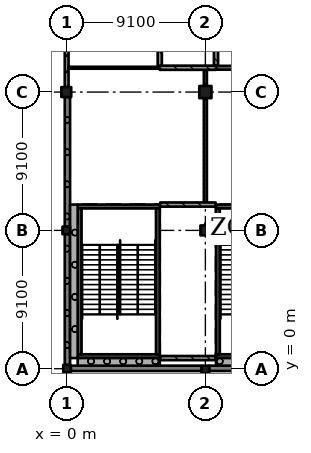
"""IFC4 building model, lengths in metres.
Left out: names, types, materials, properties, quantities, classifications, styles, units other than length and angle.
Written with IfcOpenShell. Run it as: python <this file> out.ifc"""

import sys

from ifc_helpers import new_model, si_unit, direction, frame, frame_2d, origin, origin_2d, place, context, subcontext, project, spatial, rectangle, extrude, element, fill, save


model = new_model("IFC4")
c1 = context("Model", 3, precision=1e-05, world=origin(), true_north=direction((0.0, 1.0)))
c2 = subcontext(c1, "Body", "Model", "MODEL_VIEW")
j1 = project(units=[si_unit("LENGTHUNIT", "METRE"), si_unit("PLANEANGLEUNIT", "RADIAN")], contexts=[c1])
p1 = place(None, origin())
s1 = spatial("IfcSite", under=j1, at=p1, CompositionType="ELEMENT")
p2 = place(p1, origin())
s2 = spatial("IfcBuilding", under=s1, at=p2, CompositionType="ELEMENT")
p3 = place(p2, frame((0.0, 0.0, 10.92)))
s3 = spatial("IfcBuildingStorey", under=s2, at=p3, CompositionType="ELEMENT", Elevation=10.92)
for number, where, z_axis, x_axis in (
    (1, (0.0, 0.0, 0.0), (0.0, 0.0, 1.0), (1.0, 0.0, 0.0)),
    (2, (-0.05, 9.1, 0.0), (0.0, 0.0, 1.0), (1.0, 0.0, 0.0)),
):
    element("IfcColumn", number, at=place(p3, frame(where, z_axis=z_axis, x_axis=x_axis)), inside=s3, PredefinedType="COLUMN", context=c2, shape_type="SweptSolid", body=[
        extrude(rectangle(XDim=0.5, YDim=0.5, at=origin_2d()), origin(), (0.0, 0.0, 1.0), 4.55),
    ])
p4 = place(p3, frame((-0.05, 18.2, 0.0), z_axis=(0.0, 0.0, 1.0), x_axis=(1.0, 0.0, 0.0)))
e3 = element("IfcColumn", 3, at=p4, inside=s3, PredefinedType="COLUMN", context=c2, shape_type="SweptSolid", body=[
    extrude(rectangle(XDim=0.65, YDim=0.65, at=origin_2d()), origin(), (0.0, 0.0, 1.0), 4.55),
])
p5 = place(p3, frame((9.1, -0.05, 0.0), z_axis=(0.0, 0.0, 1.0), x_axis=(1.0, 0.0, 0.0)))
e4 = element("IfcColumn", 4, at=p5, inside=s3, PredefinedType="COLUMN", context=c2, shape_type="SweptSolid", body=[
    extrude(rectangle(XDim=0.5, YDim=0.5, at=origin_2d()), origin(), (0.0, 0.0, 1.0), 4.55),
])
p6 = place(p3, frame((9.1, 9.1, 0.0), z_axis=(0.0, 0.0, 1.0), x_axis=(1.0, 0.0, 0.0)))
e5 = element("IfcColumn", 5, at=p6, inside=s3, PredefinedType="COLUMN", context=c2, shape_type="SweptSolid", body=[
    extrude(rectangle(XDim=0.65, YDim=0.65, at=origin_2d()), origin(), (0.0, 0.0, 1.0), 4.55),
])
p7 = place(p3, frame((9.1, 18.2, 0.0), z_axis=(0.0, 0.0, 1.0), x_axis=(1.0, 0.0, 0.0)))
e6 = element("IfcColumn", 6, at=p7, inside=s3, PredefinedType="COLUMN", context=c2, shape_type="SweptSolid", body=[
    extrude(rectangle(XDim=0.8, YDim=0.8, at=origin_2d()), origin(), (0.0, 0.0, 1.0), 4.55),
])
p8 = place(p3, frame((6.1, 0.825, 0.0), z_axis=(0.0, 0.0, 1.0), x_axis=(-1.0, 0.0, 0.0)))
e7 = element("IfcWall", 7, at=p8, inside=s3, PredefinedType="SHEAR", context=c2, shape_type="SweptSolid", body=[
    extrude(rectangle(XDim=5.4, YDim=0.25, at=frame_2d((2.7, 0.0))), origin(), (0.0, 0.0, 1.0), 4.55),
])
p9 = place(p3, frame((6.1, 10.675, 0.0), z_axis=(0.0, 0.0, 1.0), x_axis=(-1.0, 0.0, 0.0)))
e8 = element("IfcWall", 8, at=p9, inside=s3, PredefinedType="SHEAR", context=c2, shape_type="SweptSolid", body=[
    extrude(rectangle(XDim=5.4, YDim=0.25, at=frame_2d((2.7, 0.0))), origin(), (0.0, 0.0, 1.0), 4.55),
])
p10 = place(p9, frame((1.5, 0.0, 0.0)))
e9 = element("IfcOpeningElement", 9, at=p10, cuts=e8, PredefinedType="OPENING", context=c2, shape_type="SweptSolid", body=[
    extrude(rectangle(XDim=2.4, YDim=2.1, at=frame_2d((1.2, 1.05))), frame((0.0, 0.135, 0.0), z_axis=(0.0, -1.0, 0.0), x_axis=(1.0, 0.0, 0.0)), (0.0, 0.0, 1.0), 0.27),
])
for number, where, z_axis, x_axis in (
    (10, (0.825, 10.55, 0.0), (0.0, 0.0, 1.0), (0.0, -1.0, 0.0)),
    (11, (5.975, 10.55, 0.0), (0.0, 0.0, 1.0), (0.0, -1.0, 0.0)),
):
    element("IfcWall", number, at=place(p3, frame(where, z_axis=z_axis, x_axis=x_axis)), inside=s3, PredefinedType="SHEAR", context=c2, shape_type="SweptSolid", body=[
        extrude(rectangle(XDim=9.6, YDim=0.25, at=frame_2d((4.8, 0.0))), origin(), (0.0, 0.0, 1.0), 4.55),
    ])
p11 = place(p3, frame((15.2, 0.825, 0.0), z_axis=(0.0, 0.0, 1.0), x_axis=(-1.0, 0.0, 0.0)))
e12 = element("IfcWall", 12, at=p11, inside=s3, PredefinedType="SHEAR", context=c2, shape_type="SweptSolid", body=[
    extrude(rectangle(XDim=5.4, YDim=0.25, at=frame_2d((2.7, 0.0))), origin(), (0.0, 0.0, 1.0), 4.55),
])
p12 = place(p3, frame((15.2, 10.675, 0.0), z_axis=(0.0, 0.0, 1.0), x_axis=(-1.0, 0.0, 0.0)))
e13 = element("IfcWall", 13, at=p12, inside=s3, PredefinedType="SHEAR", context=c2, shape_type="SweptSolid", body=[
    extrude(rectangle(XDim=5.4, YDim=0.25, at=frame_2d((2.7, 0.0))), origin(), (0.0, 0.0, 1.0), 4.55),
])
p13 = place(p12, frame((1.5, 0.0, 0.0)))
e14 = element("IfcOpeningElement", 14, at=p13, cuts=e13, PredefinedType="OPENING", context=c2, shape_type="SweptSolid", body=[
    extrude(rectangle(XDim=2.4, YDim=2.1, at=frame_2d((1.2, 1.05))), frame((0.0, 0.135, 0.0), z_axis=(0.0, -1.0, 0.0), x_axis=(1.0, 0.0, 0.0)), (0.0, 0.0, 1.0), 0.27),
])
p14 = place(p3, frame((9.925, 10.55, 0.0), z_axis=(0.0, 0.0, 1.0), x_axis=(0.0, -1.0, 0.0)))
e15 = element("IfcWall", 15, at=p14, inside=s3, PredefinedType="SHEAR", context=c2, shape_type="SweptSolid", body=[
    extrude(rectangle(XDim=9.6, YDim=0.25, at=frame_2d((4.8, 0.0))), origin(), (0.0, 0.0, 1.0), 4.55),
])
p15 = place(p3, frame((0.25, 0.025, 0.0), z_axis=(0.0, 0.0, 1.0), x_axis=(1.0, 0.0, 0.0)))
e16 = element("IfcWall", 16, at=p15, inside=s3, PredefinedType="SOLIDWALL", context=c2, shape_type="SweptSolid", body=[
    extrude(rectangle(XDim=8.6, YDim=0.35, at=frame_2d((4.3, 0.0))), origin(), (0.0, 0.0, 1.0), 3.5),
])
p16 = place(p3, frame((9.35, 0.025, 0.0), z_axis=(0.0, 0.0, 1.0), x_axis=(1.0, 0.0, 0.0)))
e17 = element("IfcWall", 17, at=p16, inside=s3, PredefinedType="SOLIDWALL", context=c2, shape_type="SweptSolid", body=[
    extrude(rectangle(XDim=5.85, YDim=0.35, at=frame_2d((2.925, 0.0))), origin(), (0.0, 0.0, 1.0), 3.5),
])
p17 = place(p3, frame((-0.025, 26.975, 0.0), z_axis=(0.0, 0.0, 1.0), x_axis=(0.0, -1.0, 0.0)))
e18 = element("IfcWall", 18, at=p17, inside=s3, PredefinedType="SOLIDWALL", context=c2, shape_type="SweptSolid", body=[
    extrude(rectangle(XDim=8.45, YDim=0.25, at=frame_2d((4.225, 0.0))), origin(), (0.0, 0.0, 1.0), 3.5),
])
p18 = place(p3, frame((0.025, 17.875, 0.0), z_axis=(0.0, 0.0, 1.0), x_axis=(0.0, -1.0, 0.0)))
e19 = element("IfcWall", 19, at=p18, inside=s3, PredefinedType="SOLIDWALL", context=c2, shape_type="SweptSolid", body=[
    extrude(rectangle(XDim=8.525, YDim=0.35, at=frame_2d((4.262, 0.0))), origin(), (0.0, 0.0, 1.0), 3.5),
])
p19 = place(p3, frame((0.025, 8.85, 0.0), z_axis=(0.0, 0.0, 1.0), x_axis=(0.0, -1.0, 0.0)))
e20 = element("IfcWall", 20, at=p19, inside=s3, PredefinedType="SOLIDWALL", context=c2, shape_type="SweptSolid", body=[
    extrude(rectangle(XDim=8.6, YDim=0.35, at=frame_2d((4.3, 0.0))), origin(), (0.0, 0.0, 1.0), 3.5),
])
p20 = place(p3, frame((0.7, 0.45, 0.0), z_axis=(0.0, 0.0, 1.0), x_axis=(1.0, 0.0, 0.0)))
e21 = element("IfcWall", 21, at=p20, inside=s3, PredefinedType="SOLIDWALL", context=c2, shape_type="SweptSolid", body=[
    extrude(rectangle(XDim=5.4, YDim=0.5, at=frame_2d((2.7, 0.0))), origin(), (0.0, 0.0, 1.0), 4.55),
])
p21 = place(p3, frame((0.45, 0.7, 0.0), z_axis=(0.0, 0.0, 1.0), x_axis=(0.0, 1.0, 0.0)))
e22 = element("IfcWall", 22, at=p21, inside=s3, PredefinedType="SOLIDWALL", context=c2, shape_type="SweptSolid", body=[
    extrude(rectangle(XDim=10.1, YDim=0.5, at=frame_2d((5.05, 0.0))), origin(), (0.0, 0.0, 1.0), 4.25),
])
p22 = place(p3, frame((9.8, 0.45, 0.0), z_axis=(0.0, 0.0, 1.0), x_axis=(1.0, 0.0, 0.0)))
e23 = element("IfcWall", 23, at=p22, inside=s3, PredefinedType="SOLIDWALL", context=c2, shape_type="SweptSolid", body=[
    extrude(rectangle(XDim=5.4, YDim=0.5, at=frame_2d((2.7, 0.0))), origin(), (0.0, 0.0, 1.0), 4.55),
])
p23 = place(p3, frame((0.1, 19.8, 0.0), z_axis=(0.0, 0.0, 1.0), x_axis=(1.0, 0.0, 0.0)))
e24 = element("IfcWall", 24, at=p23, inside=s3, PredefinedType="PARTITIONING", context=c2, shape_type="SweptSolid", body=[
    extrude(rectangle(XDim=6.0, YDim=0.125, at=frame_2d((3.0, 0.0))), origin(), (0.0, 0.0, 1.0), 4.25),
])
p24 = place(p23, frame((2.85, 0.0, 0.0)))
e25 = element("IfcOpeningElement", 25, at=p24, cuts=e24, PredefinedType="OPENING", context=c2, shape_type="SweptSolid", body=[
    extrude(rectangle(XDim=0.9, YDim=2.1, at=frame_2d((0.45, 1.05))), frame((0.0, 0.073, 0.0), z_axis=(0.0, -1.0, 0.0), x_axis=(1.0, 0.0, 0.0)), (0.0, 0.0, 1.0), 0.145),
])
p25 = place(p3, frame((6.1, 19.8, 0.0), z_axis=(0.0, 0.0, 1.0), x_axis=(1.0, 0.0, 0.0)))
e26 = element("IfcWall", 26, at=p25, inside=s3, PredefinedType="SOLIDWALL", context=c2, shape_type="SweptSolid", body=[
    extrude(rectangle(XDim=3.7, YDim=0.275, at=frame_2d((1.85, 0.0))), origin(), (0.0, 0.0, 1.0), 4.25),
])
p26 = place(p25, frame((0.95, 0.0, 0.0)))
e27 = element("IfcOpeningElement", 27, at=p26, cuts=e26, PredefinedType="OPENING", context=c2, shape_type="SweptSolid", body=[
    extrude(rectangle(XDim=1.2, YDim=2.4, at=frame_2d((0.6, 1.2))), frame((0.0, 0.147, 0.0), z_axis=(0.0, -1.0, 0.0), x_axis=(1.0, 0.0, 0.0)), (0.0, 0.0, 1.0), 0.295),
])
p27 = place(p3, frame((6.1, 29.637, 0.0), z_axis=(0.0, 0.0, 1.0), x_axis=(0.0, -1.0, 0.0)))
e28 = element("IfcWall", 28, at=p27, inside=s3, PredefinedType="SOLIDWALL", context=c2, shape_type="SweptSolid", body=[
    extrude(rectangle(XDim=9.7, YDim=0.275, at=frame_2d((4.85, 0.0))), origin(), (0.0, 0.0, 1.0), 4.25),
])
p28 = place(p3, frame((9.1, 9.425, 0.0), z_axis=(0.0, 0.0, 1.0), x_axis=(1.0, 0.0, 0.0)))
e29 = element("IfcWall", 29, at=p28, inside=s3, PredefinedType="SOLIDWALL", context=c2, shape_type="SweptSolid", body=[
    extrude(rectangle(XDim=0.67, YDim=0.275, at=frame_2d((0.335, 0.0))), origin(), (0.0, 0.0, 1.0), 4.25),
])
p29 = place(p3, frame((6.13, 10.8, 0.0), z_axis=(0.0, 0.0, 1.0), x_axis=(1.0, 0.0, 0.0)))
e30 = element("IfcWall", 30, at=p29, inside=s3, PredefinedType="SOLIDWALL", context=c2, shape_type="SweptSolid", body=[
    extrude(rectangle(XDim=3.64, YDim=0.275, at=frame_2d((1.82, 0.0))), origin(), (0.0, 0.0, 1.0), 4.25),
])
p30 = place(p29, frame((0.92, 0.0, 0.0)))
e31 = element("IfcOpeningElement", 31, at=p30, cuts=e30, PredefinedType="OPENING", context=c2, shape_type="SweptSolid", body=[
    extrude(rectangle(XDim=1.2, YDim=2.4, at=frame_2d((0.6, 1.2))), frame((0.0, 0.147, 0.0), z_axis=(0.0, -1.0, 0.0), x_axis=(1.0, 0.0, 0.0)), (0.0, 0.0, 1.0), 0.295),
])
p31 = place(p3, frame((9.1, 17.8, 0.0), z_axis=(0.0, 0.0, 1.0), x_axis=(0.0, -1.0, 0.0)))
e32 = element("IfcWall", 32, at=p31, inside=s3, PredefinedType="PARTITIONING", context=c2, shape_type="SweptSolid", body=[
    extrude(rectangle(XDim=6.863, YDim=0.2, at=frame_2d((3.431, 0.0))), origin(), (0.0, 0.0, 1.0), 3.55),
])
p32 = place(p31, frame((0.85, 0.0, 0.0)))
e33 = element("IfcOpeningElement", 33, at=p32, cuts=e32, PredefinedType="OPENING", context=c2, shape_type="SweptSolid", body=[
    extrude(rectangle(XDim=1.8, YDim=2.4, at=frame_2d((0.9, 1.2))), frame((0.0, 0.11, 0.0), z_axis=(0.0, -1.0, 0.0), x_axis=(1.0, 0.0, 0.0)), (0.0, 0.0, 1.0), 0.22),
])
p33 = place(p31, frame((4.25, 0.0, 0.0)))
e34 = element("IfcOpeningElement", 34, at=p33, cuts=e32, PredefinedType="OPENING", context=c2, shape_type="SweptSolid", body=[
    extrude(rectangle(XDim=1.8, YDim=2.4, at=frame_2d((0.9, 1.2))), frame((0.0, 0.11, 0.0), z_axis=(0.0, -1.0, 0.0), x_axis=(1.0, 0.0, 0.0)), (0.0, 0.0, 1.0), 0.22),
])
p34 = place(p3, frame((9.1, 19.663, 0.0), z_axis=(0.0, 0.0, 1.0), x_axis=(0.0, -1.0, 0.0)))
e35 = element("IfcWall", 35, at=p34, inside=s3, PredefinedType="PARTITIONING", context=c2, shape_type="SweptSolid", body=[
    extrude(rectangle(XDim=1.062, YDim=0.2, at=frame_2d((0.531, 0.0))), origin(), (0.0, 0.0, 1.0), 3.55),
])
p35 = place(p3, frame((9.425, 8.775, 0.0), z_axis=(0.0, 0.0, 1.0), x_axis=(1.0, 0.0, 0.0)))
e36 = element("IfcWall", 36, at=p35, inside=s3, PredefinedType="SOLIDWALL", context=c2, shape_type="SweptSolid", body=[
    extrude(rectangle(XDim=0.345, YDim=0.275, at=frame_2d((0.172, 0.0))), origin(), (0.0, 0.0, 1.0), 4.25),
])
p36 = place(p3, frame((9.77, 0.7, 0.0), z_axis=(0.0, 0.0, 1.0), x_axis=(-1.0, 0.0, 0.0)))
e37 = element("IfcWall", 37, at=p36, inside=s3, PredefinedType="SOLIDWALL", context=c2, shape_type="SweptSolid", body=[
    extrude(rectangle(XDim=3.64, YDim=0.275, at=frame_2d((1.82, 0.0))), origin(), (0.0, 0.0, 1.0), 4.25),
])
p37 = place(p3, frame((9.8, 19.8, 0.0), z_axis=(0.0, 0.0, 1.0), x_axis=(1.0, 0.0, 0.0)))
e38 = element("IfcWall", 38, at=p37, inside=s3, PredefinedType="SOLIDWALL", context=c2, shape_type="SweptSolid", body=[
    extrude(rectangle(XDim=5.525, YDim=0.25, at=frame_2d((2.762, 0.0))), origin(), (0.0, 0.0, 1.0), 4.25),
])
p38 = place(p37, frame((2.25, 0.0, 0.0)))
e39 = element("IfcOpeningElement", 39, at=p38, cuts=e38, PredefinedType="OPENING", context=c2, shape_type="SweptSolid", body=[
    extrude(rectangle(XDim=1.0, YDim=2.1, at=frame_2d((0.5, 1.05))), frame((0.0, 0.135, 0.0), z_axis=(0.0, -1.0, 0.0), x_axis=(1.0, 0.0, 0.0)), (0.0, 0.0, 1.0), 0.27),
])
p39 = place(p3, frame((9.8, 19.938, 0.0), z_axis=(0.0, 0.0, 1.0), x_axis=(0.0, 1.0, 0.0)))
e40 = element("IfcWall", 40, at=p39, inside=s3, PredefinedType="SOLIDWALL", context=c2, shape_type="SweptSolid", body=[
    extrude(rectangle(XDim=6.825, YDim=0.275, at=frame_2d((3.413, 0.0))), origin(), (0.0, 0.0, 1.0), 4.25),
])
p40 = place(p26, origin())
e41 = element("IfcDoor", 41, at=p40, inside=s3, OperationType="SINGLE_SWING_LEFT", PredefinedType="DOOR", context=c2, shape_type="SweptSolid", body=[
    extrude(rectangle(XDim=1.2, YDim=2.4, at=frame_2d((0.6, 1.2))), frame((0.0, 0.025, 0.0), z_axis=(0.0, -1.0, 0.0), x_axis=(1.0, 0.0, 0.0)), (0.0, 0.0, 1.0), 0.05),
])
fill(e27, e41)
p41 = place(p24, origin())
e42 = element("IfcDoor", 42, at=p41, inside=s3, OperationType="SINGLE_SWING_LEFT", PredefinedType="DOOR", context=c2, shape_type="SweptSolid", body=[
    extrude(rectangle(XDim=0.9, YDim=2.1, at=frame_2d((0.45, 1.05))), frame((0.0, 0.025, 0.0), z_axis=(0.0, -1.0, 0.0), x_axis=(1.0, 0.0, 0.0)), (0.0, 0.0, 1.0), 0.05),
])
fill(e25, e42)
p42 = place(p30, origin())
e43 = element("IfcDoor", 43, at=p42, inside=s3, OperationType="SINGLE_SWING_RIGHT", PredefinedType="DOOR", context=c2, shape_type="SweptSolid", body=[
    extrude(rectangle(XDim=1.2, YDim=2.4, at=frame_2d((0.6, 1.2))), frame((0.0, 0.025, 0.0), z_axis=(0.0, -1.0, 0.0), x_axis=(1.0, 0.0, 0.0)), (0.0, 0.0, 1.0), 0.05),
])
fill(e31, e43)
p43 = place(p32, origin())
e44 = element("IfcDoor", 44, at=p43, inside=s3, OperationType="DOUBLE_DOOR_SINGLE_SWING", PredefinedType="DOOR", context=c2, shape_type="SweptSolid", body=[
    extrude(rectangle(XDim=1.8, YDim=2.4, at=frame_2d((0.9, 1.2))), frame((0.0, 0.025, 0.0), z_axis=(0.0, -1.0, 0.0), x_axis=(1.0, 0.0, 0.0)), (0.0, 0.0, 1.0), 0.05),
])
fill(e33, e44)
p44 = place(p33, origin())
e45 = element("IfcDoor", 45, at=p44, inside=s3, OperationType="DOUBLE_DOOR_SINGLE_SWING", PredefinedType="DOOR", context=c2, shape_type="SweptSolid", body=[
    extrude(rectangle(XDim=1.8, YDim=2.4, at=frame_2d((0.9, 1.2))), frame((0.0, 0.025, 0.0), z_axis=(0.0, -1.0, 0.0), x_axis=(1.0, 0.0, 0.0)), (0.0, 0.0, 1.0), 0.05),
])
fill(e34, e45)
p45 = place(p10, origin())
e46 = element("IfcDoor", 46, at=p45, inside=s3, OperationType="DOUBLE_DOOR_SINGLE_SWING", PredefinedType="DOOR", context=c2, shape_type="SweptSolid", body=[
    extrude(rectangle(XDim=2.4, YDim=2.1, at=frame_2d((1.2, 1.05))), frame((0.0, 0.025, 0.0), z_axis=(0.0, -1.0, 0.0), x_axis=(1.0, 0.0, 0.0)), (0.0, 0.0, 1.0), 0.05),
])
fill(e9, e46)
save(model, sys.argv[1])
